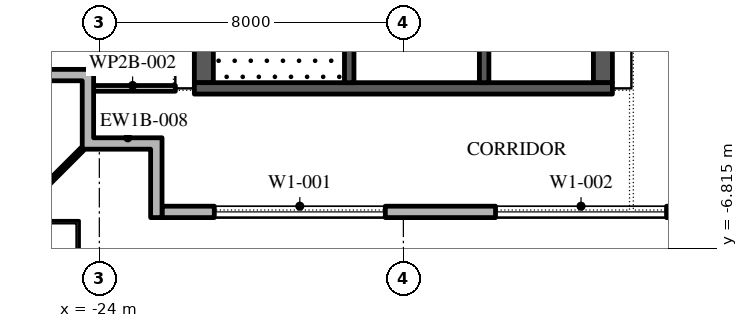
"""IFC4 building model, lengths in metres.
Left out: names, types, materials, properties, quantities, classifications, styles, units other than length and angle.
Written with IfcOpenShell. Run it as: python <this file> out.ifc"""

import sys

from ifc_helpers import new_model, si_unit, direction, frame, frame_2d, origin, place, context, subcontext, project, spatial, polyline, rectangle, outline, extrude, element, fill, save


model = new_model("IFC4")
c1 = context("Model", 3, precision=1e-05, world=origin(), true_north=direction((0.0, 1.0)))
c2 = subcontext(c1, "Body", "Model", "MODEL_VIEW")
j1 = project(units=[si_unit("LENGTHUNIT", "METRE"), si_unit("PLANEANGLEUNIT", "RADIAN")], contexts=[c1])
p1 = place(None, origin())
s1 = spatial("IfcSite", under=j1, at=p1, CompositionType="ELEMENT")
p2 = place(p1, origin())
s2 = spatial("IfcBuilding", under=s1, at=p2, CompositionType="ELEMENT")
p3 = place(p2, frame((0.0, 0.0, 355.2)))
s3 = spatial("IfcBuildingStorey", under=s2, at=p3, CompositionType="ELEMENT", Elevation=355.2)
p4 = place(p3, frame((-22.35, -5.85, 0.0), z_axis=(0.0, 0.0, 1.0), x_axis=(1.0, 0.0, 0.0)))
e1 = element("IfcWall", 1, at=p4, inside=s3, PredefinedType="STANDARD", context=c2, shape_type="SweptSolid", body=[
    extrude(rectangle(XDim=45.0, YDim=0.3, at=frame_2d((22.5, 0.0))), origin(), (0.0, 0.0, 1.0), 3.95),
])
p5 = place(p4, frame((1.375, 0.0, 0.45)))
e2 = element("IfcOpeningElement", 2, at=p5, cuts=e1, PredefinedType="OPENING", context=c2, shape_type="SweptSolid", body=[
    extrude(rectangle(XDim=4.5, YDim=3.05, at=frame_2d((2.25, 1.525))), frame((0.0, 0.16, 0.0), z_axis=(0.0, -1.0, 0.0), x_axis=(1.0, 0.0, 0.0)), (0.0, 0.0, 1.0), 0.32),
])
p6 = place(p4, frame((8.775, 0.0, 0.45)))
e3 = element("IfcOpeningElement", 3, at=p6, cuts=e1, PredefinedType="OPENING", context=c2, shape_type="SweptSolid", body=[
    extrude(rectangle(XDim=4.5, YDim=3.05, at=frame_2d((2.25, 1.525))), frame((0.0, 0.16, 0.0), z_axis=(0.0, -1.0, 0.0), x_axis=(1.0, 0.0, 0.0)), (0.0, 0.0, 1.0), 0.32),
])
p7 = place(p4, frame((17.375, 0.0, 0.0)))
e4 = element("IfcOpeningElement", 4, at=p7, cuts=e1, PredefinedType="OPENING", context=c2, shape_type="SweptSolid", body=[
    extrude(rectangle(XDim=2.4, YDim=3.5, at=frame_2d((1.2, 1.75))), frame((0.0, 0.16, 0.0), z_axis=(0.0, -1.0, 0.0), x_axis=(1.0, 0.0, 0.0)), (0.0, 0.0, 1.0), 0.32),
])
p8 = place(p4, frame((23.875, 0.0, 0.45)))
e5 = element("IfcOpeningElement", 5, at=p8, cuts=e1, PredefinedType="OPENING", context=c2, shape_type="SweptSolid", body=[
    extrude(rectangle(XDim=4.5, YDim=3.05, at=frame_2d((2.25, 1.525))), frame((0.0, 0.16, 0.0), z_axis=(0.0, -1.0, 0.0), x_axis=(1.0, 0.0, 0.0)), (0.0, 0.0, 1.0), 0.32),
])
p9 = place(p4, frame((31.425, 0.0, 0.45)))
e6 = element("IfcOpeningElement", 6, at=p9, cuts=e1, PredefinedType="OPENING", context=c2, shape_type="SweptSolid", body=[
    extrude(rectangle(XDim=4.5, YDim=3.05, at=frame_2d((2.25, 1.525))), frame((0.0, 0.16, 0.0), z_axis=(0.0, -1.0, 0.0), x_axis=(1.0, 0.0, 0.0)), (0.0, 0.0, 1.0), 0.32),
])
p10 = place(p4, frame((38.975, 0.0, 0.45)))
e7 = element("IfcOpeningElement", 7, at=p10, cuts=e1, PredefinedType="OPENING", context=c2, shape_type="SweptSolid", body=[
    extrude(rectangle(XDim=4.5, YDim=3.05, at=frame_2d((2.25, 1.525))), frame((0.0, 0.16, 0.0), z_axis=(0.0, -1.0, 0.0), x_axis=(1.0, 0.0, 0.0)), (0.0, 0.0, 1.0), 0.32),
])
p11 = place(p3, origin())
e8 = element("IfcWall", 8, at=p11, inside=s3, PredefinedType="STANDARD", context=c2, shape_type="SweptSolid", body=[
    extrude(outline(polyline([(-22.65, -4.2), (-24.45, -4.2), (-24.45, -2.4), (-25.95, -2.4), (-25.95, -2.1), (-24.15, -2.1), (-24.15, -3.9), (-22.35, -3.9), (-22.35, -6.0), (-22.65, -6.0), (-22.65, -4.2)])), origin(), (0.0, 0.0, 1.0), 3.95),
])
p12 = place(p3, frame((-24.45, -4.2, -0.05), z_axis=(0.0, 0.0, 1.0), x_axis=(-0.707106781187, -0.707106781187, 0.0)))
e9 = element("IfcWall", 9, at=p12, inside=s3, PredefinedType="STANDARD", context=c2, shape_type="SweptSolid", body=[
    extrude(rectangle(XDim=2.667, YDim=0.1, at=frame_2d((1.333, 0.0))), origin(), (0.0, 0.0, 1.0), 4.0),
])
p13 = place(p3, frame((-21.25, -2.45, 0.0), z_axis=(0.0, 0.0, 1.0), x_axis=(0.0, 1.0, 0.0)))
e10 = element("IfcWall", 10, at=p13, inside=s3, PredefinedType="SHEAR", context=c2, shape_type="SweptSolid", body=[
    extrude(rectangle(XDim=27.9, YDim=0.5, at=frame_2d((13.95, 0.0))), origin(), (0.0, 0.0, 1.0), 3.95),
])
p14 = place(p13, frame((5.05, 0.0, 0.0)))
e11 = element("IfcOpeningElement", 11, at=p14, cuts=e10, PredefinedType="OPENING", context=c2, shape_type="SweptSolid", body=[
    extrude(rectangle(XDim=1.2, YDim=2.1, at=frame_2d((0.6, 1.05))), frame((0.0, 0.26, 0.0), z_axis=(0.0, -1.0, 0.0), x_axis=(1.0, 0.0, 0.0)), (0.0, 0.0, 1.0), 0.52),
])
p15 = place(p13, frame((21.65, 0.0, 0.0)))
e12 = element("IfcOpeningElement", 12, at=p15, cuts=e10, PredefinedType="OPENING", context=c2, shape_type="SweptSolid", body=[
    extrude(rectangle(XDim=1.2, YDim=2.1, at=frame_2d((0.6, 1.05))), frame((0.0, 0.26, 0.0), z_axis=(0.0, -1.0, 0.0), x_axis=(1.0, 0.0, 0.0)), (0.0, 0.0, 1.0), 0.52),
])
p16 = place(p3, frame((-10.75, -2.45, 0.0), z_axis=(0.0, 0.0, 1.0), x_axis=(0.0, 1.0, 0.0)))
e13 = element("IfcWall", 13, at=p16, inside=s3, PredefinedType="SHEAR", context=c2, shape_type="SweptSolid", body=[
    extrude(rectangle(XDim=27.9, YDim=0.5, at=frame_2d((13.95, 0.0))), origin(), (0.0, 0.0, 1.0), 3.95),
])
p17 = place(p16, frame((23.65, 0.0, 0.0)))
e14 = element("IfcOpeningElement", 14, at=p17, cuts=e13, PredefinedType="OPENING", context=c2, shape_type="SweptSolid", body=[
    extrude(rectangle(XDim=2.4, YDim=2.1, at=frame_2d((1.2, 1.05))), frame((0.0, 0.26, 0.0), z_axis=(0.0, -1.0, 0.0), x_axis=(1.0, 0.0, 0.0)), (0.0, 0.0, 1.0), 0.52),
])
p18 = place(p16, frame((1.087, 0.0, 0.0)))
e15 = element("IfcOpeningElement", 15, at=p18, cuts=e13, PredefinedType="OPENING", context=c2, shape_type="SweptSolid", body=[
    extrude(rectangle(XDim=0.9, YDim=2.1, at=frame_2d((0.45, 1.05))), frame((0.0, 0.26, 0.0), z_axis=(0.0, -1.0, 0.0), x_axis=(1.0, 0.0, 0.0)), (0.0, 0.0, 1.0), 0.52),
])
p19 = place(p16, frame((4.262, 0.0, 0.0)))
e16 = element("IfcOpeningElement", 16, at=p19, cuts=e13, PredefinedType="OPENING", context=c2, shape_type="SweptSolid", body=[
    extrude(rectangle(XDim=1.0, YDim=2.1, at=frame_2d((0.5, 1.05))), frame((0.0, 0.26, 0.0), z_axis=(0.0, -1.0, 0.0), x_axis=(1.0, 0.0, 0.0)), (0.0, 0.0, 1.0), 0.52),
])
p20 = place(p3, frame((-21.5, -2.6, 0.0), z_axis=(0.0, 0.0, 1.0), x_axis=(1.0, 0.0, 0.0)))
e17 = element("IfcWall", 17, at=p20, inside=s3, PredefinedType="SHEAR", context=c2, shape_type="SweptSolid", body=[
    extrude(rectangle(XDim=11.0, YDim=0.3, at=frame_2d((5.5, 0.0))), origin(), (0.0, 0.0, 1.0), 3.95),
])
p21 = place(p3, frame((-17.425, -2.45, 0.0), z_axis=(0.0, 0.0, 1.0), x_axis=(0.0, 1.0, 0.0)))
e18 = element("IfcWall", 18, at=p21, inside=s3, PredefinedType="SHEAR", context=c2, shape_type="SweptSolid", body=[
    extrude(rectangle(XDim=6.3, YDim=0.25, at=frame_2d((3.15, 0.0))), origin(), (0.0, 0.0, 1.0), 3.95),
])
p22 = place(p21, frame((5.05, 0.0, 0.0)))
e19 = element("IfcOpeningElement", 19, at=p22, cuts=e18, PredefinedType="OPENING", context=c2, shape_type="SweptSolid", body=[
    extrude(rectangle(XDim=1.2, YDim=2.1, at=frame_2d((0.6, 1.05))), frame((0.0, 0.135, 0.0), z_axis=(0.0, -1.0, 0.0), x_axis=(1.0, 0.0, 0.0)), (0.0, 0.0, 1.0), 0.27),
])
p23 = place(p3, frame((-13.875, -2.45, 0.0), z_axis=(0.0, 0.0, 1.0), x_axis=(0.0, 1.0, 0.0)))
e20 = element("IfcWall", 20, at=p23, inside=s3, PredefinedType="SHEAR", context=c2, shape_type="SweptSolid", body=[
    extrude(rectangle(XDim=21.3, YDim=0.25, at=frame_2d((10.65, 0.0))), origin(), (0.0, 0.0, 1.0), 3.95),
])
p24 = place(p23, frame((11.357, 0.0, 0.0)))
e21 = element("IfcOpeningElement", 21, at=p24, cuts=e20, PredefinedType="OPENING", context=c2, shape_type="SweptSolid", body=[
    extrude(rectangle(XDim=0.9, YDim=2.1, at=frame_2d((0.45, 1.05))), frame((0.0, 0.135, 0.0), z_axis=(0.0, -1.0, 0.0), x_axis=(1.0, 0.0, 0.0)), (0.0, 0.0, 1.0), 0.27),
])
p25 = place(p23, frame((6.971, 0.0, 0.0)))
e22 = element("IfcOpeningElement", 22, at=p25, cuts=e20, PredefinedType="OPENING", context=c2, shape_type="SweptSolid", body=[
    extrude(rectangle(XDim=1.1, YDim=2.1, at=frame_2d((0.55, 1.05))), frame((0.0, 0.135, 0.0), z_axis=(0.0, -1.0, 0.0), x_axis=(1.0, 0.0, 0.0)), (0.0, 0.0, 1.0), 0.27),
])
p26 = place(p23, frame((15.543, 0.0, 0.0)))
e23 = element("IfcOpeningElement", 23, at=p26, cuts=e20, PredefinedType="OPENING", context=c2, shape_type="SweptSolid", body=[
    extrude(rectangle(XDim=1.1, YDim=2.1, at=frame_2d((0.55, 1.05))), frame((0.0, 0.135, 0.0), z_axis=(0.0, -1.0, 0.0), x_axis=(1.0, 0.0, 0.0)), (0.0, 0.0, 1.0), 0.27),
])
p27 = place(p23, frame((17.686, 0.0, 0.0)))
e24 = element("IfcOpeningElement", 24, at=p27, cuts=e20, PredefinedType="OPENING", context=c2, shape_type="SweptSolid", body=[
    extrude(rectangle(XDim=1.1, YDim=2.1, at=frame_2d((0.55, 1.05))), frame((0.0, 0.135, 0.0), z_axis=(0.0, -1.0, 0.0), x_axis=(1.0, 0.0, 0.0)), (0.0, 0.0, 1.0), 0.27),
])
p28 = place(p23, frame((19.829, 0.0, 0.0)))
e25 = element("IfcOpeningElement", 25, at=p28, cuts=e20, PredefinedType="OPENING", context=c2, shape_type="SweptSolid", body=[
    extrude(rectangle(XDim=1.1, YDim=2.1, at=frame_2d((0.55, 1.05))), frame((0.0, 0.135, 0.0), z_axis=(0.0, -1.0, 0.0), x_axis=(1.0, 0.0, 0.0)), (0.0, 0.0, 1.0), 0.27),
])
p29 = place(p3, frame((-24.25, -2.6, 0.0), z_axis=(0.0, 0.0, 1.0), x_axis=(1.0, 0.0, 0.0)))
e26 = element("IfcWall", 26, at=p29, inside=s3, PredefinedType="PARTITIONING", context=c2, shape_type="SweptSolid", body=[
    extrude(rectangle(XDim=2.25, YDim=0.15, at=frame_2d((1.125, 0.0))), origin(), (0.0, 0.0, 1.0), 3.95),
])
p30 = place(p5, origin())
e27 = element("IfcWindow", 27, at=p30, inside=s3, PartitioningType="DOUBLE_PANEL_VERTICAL", PredefinedType="WINDOW", context=c2, shape_type="SweptSolid", body=[
    extrude(rectangle(XDim=4.5, YDim=3.05, at=frame_2d((2.25, 1.525))), frame((0.0, 0.03, 0.0), z_axis=(0.0, -1.0, 0.0), x_axis=(1.0, 0.0, 0.0)), (0.0, 0.0, 1.0), 0.06),
])
fill(e2, e27)
p31 = place(p6, origin())
e28 = element("IfcWindow", 28, at=p31, inside=s3, PartitioningType="DOUBLE_PANEL_VERTICAL", PredefinedType="WINDOW", context=c2, shape_type="SweptSolid", body=[
    extrude(rectangle(XDim=4.5, YDim=3.05, at=frame_2d((2.25, 1.525))), frame((0.0, 0.03, 0.0), z_axis=(0.0, -1.0, 0.0), x_axis=(1.0, 0.0, 0.0)), (0.0, 0.0, 1.0), 0.06),
])
fill(e3, e28)
save(model, sys.argv[1])
